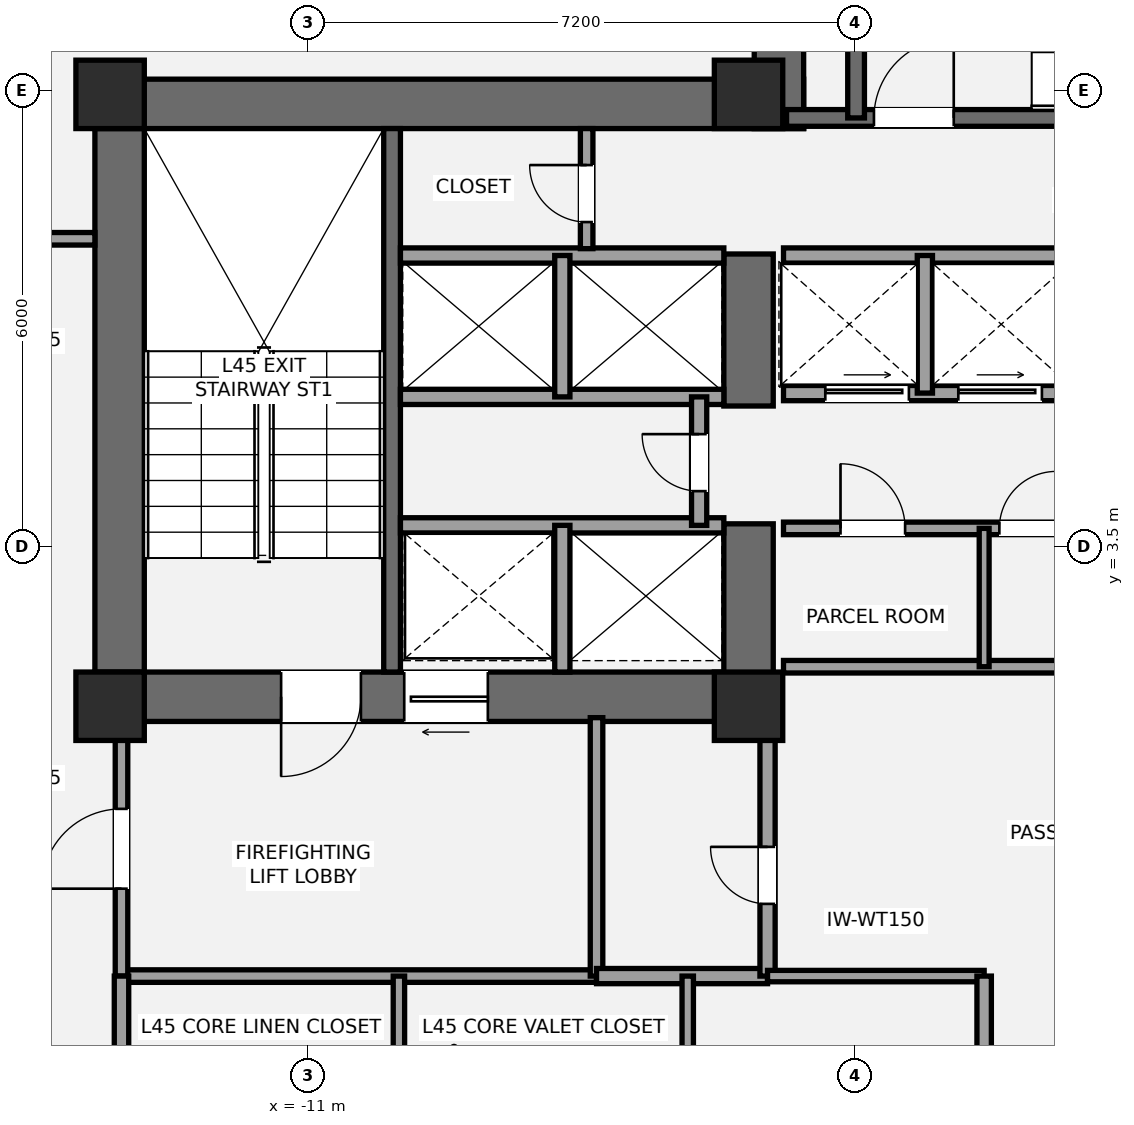
"""IFC4 building model, lengths in metres.
Left out: names, types, materials, properties, quantities, classifications, styles, units other than length and angle.
Written with IfcOpenShell. Run it as: python <this file> out.ifc"""

import sys

from ifc_helpers import new_model, si_unit, direction, frame, frame_2d, origin, origin_2d, place, context, subcontext, project, spatial, rectangle, extrude, element, fill, save


model = new_model("IFC4")
c1 = context("Model", 3, precision=1e-05, world=origin(), true_north=direction((0.0, 1.0)))
c2 = subcontext(c1, "Body", "Model", "MODEL_VIEW")
j1 = project(units=[si_unit("LENGTHUNIT", "METRE"), si_unit("PLANEANGLEUNIT", "RADIAN")], contexts=[c1])
p1 = place(None, origin())
s1 = spatial("IfcSite", under=j1, at=p1, CompositionType="ELEMENT")
p2 = place(p1, origin())
s2 = spatial("IfcBuilding", under=s1, at=p2, CompositionType="ELEMENT")
p3 = place(p2, frame((0.0, 0.0, 166.2)))
s3 = spatial("IfcBuildingStorey", under=s2, at=p3, CompositionType="ELEMENT", Elevation=166.2)
p4 = place(p3, frame((-13.475, 1.2, 0.0), z_axis=(0.0, 0.0, 1.0), x_axis=(0.0, 1.0, 0.0)))
e1 = element("IfcWall", 1, at=p4, inside=s3, PredefinedType="SHEAR", context=c2, shape_type="SweptSolid", body=[
    extrude(rectangle(XDim=8.45, YDim=0.65, at=frame_2d((4.225, 0.0))), origin(), (0.0, 0.0, 1.0), 3.2),
])
p5 = place(p3, frame((-13.8, 9.325, 0.0), z_axis=(0.0, 0.0, 1.0), x_axis=(1.0, 0.0, 0.0)))
e2 = element("IfcWall", 2, at=p5, inside=s3, PredefinedType="SHEAR", context=c2, shape_type="SweptSolid", body=[
    extrude(rectangle(XDim=9.325, YDim=0.65, at=frame_2d((4.663, 0.0))), origin(), (0.0, 0.0, 1.0), 3.2),
])
p6 = place(p3, frame((-4.875, 1.525, 0.0), z_axis=(0.0, 0.0, 1.0), x_axis=(-1.0, 0.0, 0.0)))
e3 = element("IfcWall", 3, at=p6, inside=s3, PredefinedType="SHEAR", context=c2, shape_type="SweptSolid", body=[
    extrude(rectangle(XDim=8.925, YDim=0.65, at=frame_2d((4.462, 0.0))), origin(), (0.0, 0.0, 1.0), 3.2),
])
p7 = place(p6, frame((5.425, 0.0, 0.0)))
e4 = element("IfcOpeningElement", 4, at=p7, cuts=e3, PredefinedType="OPENING", context=c2, shape_type="SweptSolid", body=[
    extrude(rectangle(XDim=1.05, YDim=2.15, at=frame_2d((0.525, 1.075))), frame((0.0, 0.335, 0.0), z_axis=(0.0, -1.0, 0.0), x_axis=(1.0, 0.0, 0.0)), (0.0, 0.0, 1.0), 0.67),
])
p8 = place(p6, frame((3.755, 0.0, 0.0)))
e5 = element("IfcOpeningElement", 5, at=p8, cuts=e3, PredefinedType="OPENING", context=c2, shape_type="SweptSolid", body=[
    extrude(rectangle(XDim=1.1, YDim=2.2, at=frame_2d((0.55, 1.1))), frame((0.0, 0.335, 0.0), z_axis=(0.0, -1.0, 0.0), x_axis=(1.0, 0.0, 0.0)), (0.0, 0.0, 1.0), 0.67),
])
p9 = place(p3, frame((-5.2, 1.2, 0.0), z_axis=(0.0, 0.0, 1.0), x_axis=(0.0, 1.0, 0.0)))
e6 = element("IfcWall", 6, at=p9, inside=s3, PredefinedType="SHEAR", context=c2, shape_type="SweptSolid", body=[
    extrude(rectangle(XDim=2.6, YDim=0.65, at=frame_2d((1.3, 0.0))), origin(), (0.0, 0.0, 1.0), 3.2),
])
p10 = place(p3, frame((-5.2, 5.35, 0.0), z_axis=(0.0, 0.0, 1.0), x_axis=(0.0, 1.0, 0.0)))
e7 = element("IfcWall", 7, at=p10, inside=s3, PredefinedType="SHEAR", context=c2, shape_type="SweptSolid", body=[
    extrude(rectangle(XDim=2.0, YDim=0.65, at=frame_2d((1.0, 0.0))), origin(), (0.0, 0.0, 1.0), 3.2),
])
p11 = place(p3, frame((-9.89, 1.85, 0.0), z_axis=(0.0, 0.0, 1.0), x_axis=(0.0, 1.0, 0.0)))
e8 = element("IfcWall", 8, at=p11, inside=s3, PredefinedType="SHEAR", context=c2, shape_type="SweptSolid", body=[
    extrude(rectangle(XDim=7.15, YDim=0.22, at=frame_2d((3.575, 0.0))), origin(), (0.0, 0.0, 1.0), 3.2),
])
p12 = place(p3, frame((-4.8, 9.0, 0.0), z_axis=(0.0, 0.0, 1.0), x_axis=(0.0, 1.0, 0.0)))
e9 = element("IfcWall", 9, at=p12, inside=s3, PredefinedType="SHEAR", context=c2, shape_type="SweptSolid", body=[
    extrude(rectangle(XDim=4.05, YDim=0.65, at=frame_2d((2.025, 0.0))), origin(), (0.0, 0.0, 1.0), 3.2),
])
p13 = place(p3, frame((-4.7, 9.14, 0.0), z_axis=(0.0, 0.0, 1.0), x_axis=(1.0, 0.0, 0.0)))
e10 = element("IfcWall", 10, at=p13, inside=s3, PredefinedType="SHEAR", context=c2, shape_type="SweptSolid", body=[
    extrude(rectangle(XDim=9.3, YDim=0.22, at=frame_2d((4.65, 0.0))), origin(), (0.0, 0.0, 1.0), 3.2),
])
p14 = place(p13, frame((1.15, 0.0, 0.0)))
e11 = element("IfcOpeningElement", 11, at=p14, cuts=e10, PredefinedType="OPENING", context=c2, shape_type="SweptSolid", body=[
    extrude(rectangle(XDim=1.05, YDim=2.15, at=frame_2d((0.525, 1.075))), frame((0.0, 0.12, 0.0), z_axis=(0.0, -1.0, 0.0), x_axis=(1.0, 0.0, 0.0)), (0.0, 0.0, 1.0), 0.24),
])
p15 = place(p3, frame((-3.785, 9.14, 0.0), z_axis=(0.0, 0.0, 1.0), x_axis=(0.0, 1.0, 0.0)))
e12 = element("IfcWall", 12, at=p15, inside=s3, PredefinedType="SHEAR", context=c2, shape_type="SweptSolid", body=[
    extrude(rectangle(XDim=3.26, YDim=0.22, at=frame_2d((1.63, 0.0))), origin(), (0.0, 0.0, 1.0), 3.2),
])
for number, where, z_axis, x_axis in (
    (13, (-13.6, 1.4, 0.0), (0.0, 0.0, 1.0), (1.0, 0.0, 0.0)),
    (14, (-13.6, 9.45, 0.0), (0.0, 0.0, 1.0), (1.0, 0.0, 0.0)),
    (15, (-5.2, 1.4, 0.0), (0.0, 0.0, 1.0), (1.0, 0.0, 0.0)),
    (16, (-5.2, 9.45, 0.0), (0.0, 0.0, 1.0), (1.0, 0.0, 0.0)),
):
    element("IfcColumn", number, at=place(p3, frame(where, z_axis=z_axis, x_axis=x_axis)), inside=s3, PredefinedType="COLUMN", context=c2, shape_type="SweptSolid", body=[
        extrude(rectangle(XDim=0.9, YDim=0.9, at=origin_2d()), origin(), (0.0, 0.0, 1.0), 3.2),
    ])
p16 = place(p3, frame((-13.45, -2.15, 0.0), z_axis=(0.0, 0.0, 1.0), x_axis=(1.0, 0.0, 0.0)))
e17 = element("IfcWall", 17, at=p16, inside=s3, PredefinedType="PARTITIONING", context=c2, shape_type="SweptSolid", body=[
    extrude(rectangle(XDim=6.25, YDim=0.165, at=frame_2d((3.125, 0.0))), origin(), (0.0, 0.0, 1.0), 3.02),
])
p17 = place(p3, frame((-13.45, -2.15, 0.0), z_axis=(0.0, 0.0, 1.0), x_axis=(0.0, 1.0, 0.0)))
e18 = element("IfcWall", 18, at=p17, inside=s3, PredefinedType="PARTITIONING", context=c2, shape_type="SweptSolid", body=[
    extrude(rectangle(XDim=3.4, YDim=0.165, at=frame_2d((1.7, 0.0))), origin(), (0.0, 0.0, 1.0), 2.473),
])
p18 = place(p17, frame((1.15, 0.0, 0.0)))
e19 = element("IfcOpeningElement", 19, at=p18, cuts=e18, PredefinedType="OPENING", context=c2, shape_type="SweptSolid", body=[
    extrude(rectangle(XDim=1.05, YDim=2.15, at=frame_2d((0.525, 1.075))), frame((0.0, 0.093, 0.0), z_axis=(0.0, -1.0, 0.0), x_axis=(1.0, 0.0, 0.0)), (0.0, 0.0, 1.0), 0.185),
])
p19 = place(p3, frame((-7.2, -2.15, 0.0), z_axis=(0.0, 0.0, 1.0), x_axis=(0.0, 1.0, 0.0)))
e20 = element("IfcWall", 20, at=p19, inside=s3, PredefinedType="PARTITIONING", context=c2, shape_type="SweptSolid", body=[
    extrude(rectangle(XDim=3.4, YDim=0.165, at=frame_2d((1.7, 0.0))), origin(), (0.0, 0.0, 1.0), 2.473),
])
p20 = place(p3, frame((-7.2, -2.15, 0.0), z_axis=(0.0, 0.0, 1.0), x_axis=(1.0, 0.0, 0.0)))
e21 = element("IfcWall", 21, at=p20, inside=s3, PredefinedType="SOLIDWALL", context=c2, shape_type="SweptSolid", body=[
    extrude(rectangle(XDim=2.25, YDim=0.2, at=frame_2d((1.125, 0.0))), origin(), (0.0, 0.0, 1.0), 3.02),
])
p21 = place(p3, frame((-4.95, -2.15, 0.0), z_axis=(0.0, 0.0, 1.0), x_axis=(0.0, 1.0, 0.0)))
e22 = element("IfcWall", 22, at=p21, inside=s3, PredefinedType="SOLIDWALL", context=c2, shape_type="SweptSolid", body=[
    extrude(rectangle(XDim=3.4, YDim=0.2, at=frame_2d((1.7, 0.0))), origin(), (0.0, 0.0, 1.0), 2.473),
])
p22 = place(p21, frame((0.95, 0.0, 0.0)))
e23 = element("IfcOpeningElement", 23, at=p22, cuts=e22, PredefinedType="OPENING", context=c2, shape_type="SweptSolid", body=[
    extrude(rectangle(XDim=0.75, YDim=2.1, at=frame_2d((0.375, 1.05))), frame((0.0, 0.11, 0.0), z_axis=(0.0, -1.0, 0.0), x_axis=(1.0, 0.0, 0.0)), (0.0, 0.0, 1.0), 0.22),
])
p23 = place(p3, frame((-9.78, 3.78, 0.0), z_axis=(0.0, 0.0, 1.0), x_axis=(1.0, 0.0, 0.0)))
e24 = element("IfcWall", 24, at=p23, inside=s3, PredefinedType="SOLIDWALL", context=c2, shape_type="SweptSolid", body=[
    extrude(rectangle(XDim=4.255, YDim=0.2, at=frame_2d((2.127, 0.0))), origin(), (0.0, 0.0, 1.0), 3.02),
])
p24 = place(p3, frame((-7.65, 1.85, 0.0), z_axis=(0.0, 0.0, 1.0), x_axis=(0.0, 1.0, 0.0)))
e25 = element("IfcWall", 25, at=p24, inside=s3, PredefinedType="SOLIDWALL", context=c2, shape_type="SweptSolid", body=[
    extrude(rectangle(XDim=1.93, YDim=0.2, at=frame_2d((0.965, 0.0))), origin(), (0.0, 0.0, 1.0), 3.02),
])
for number, where, z_axis, x_axis in (
    (26, (-9.78, 5.47, 0.0), (0.0, 0.0, 1.0), (1.0, 0.0, 0.0)),
    (27, (-9.78, 7.33, 0.0), (0.0, 0.0, 1.0), (1.0, 0.0, 0.0)),
):
    element("IfcWall", number, at=place(p3, frame(where, z_axis=z_axis, x_axis=x_axis)), inside=s3, PredefinedType="SOLIDWALL", context=c2, shape_type="SweptSolid", body=[
        extrude(rectangle(XDim=4.255, YDim=0.2, at=frame_2d((2.127, 0.0))), origin(), (0.0, 0.0, 1.0), 3.02),
    ])
p25 = place(p3, frame((-7.65, 5.47, 0.0), z_axis=(0.0, 0.0, 1.0), x_axis=(0.0, 1.0, 0.0)))
e28 = element("IfcWall", 28, at=p25, inside=s3, PredefinedType="SOLIDWALL", context=c2, shape_type="SweptSolid", body=[
    extrude(rectangle(XDim=1.86, YDim=0.2, at=frame_2d((0.93, 0.0))), origin(), (0.0, 0.0, 1.0), 3.02),
])
p26 = place(p3, frame((-5.85, 3.78, 0.0), z_axis=(0.0, 0.0, 1.0), x_axis=(0.0, 1.0, 0.0)))
e29 = element("IfcWall", 29, at=p26, inside=s3, PredefinedType="SOLIDWALL", context=c2, shape_type="SweptSolid", body=[
    extrude(rectangle(XDim=1.69, YDim=0.2, at=frame_2d((0.845, 0.0))), origin(), (0.0, 0.0, 1.0), 3.02),
])
p27 = place(p26, frame((0.45, 0.0, 0.0)))
e30 = element("IfcOpeningElement", 30, at=p27, cuts=e29, PredefinedType="OPENING", context=c2, shape_type="SweptSolid", body=[
    extrude(rectangle(XDim=0.75, YDim=2.1, at=frame_2d((0.375, 1.05))), frame((0.0, 0.11, 0.0), z_axis=(0.0, -1.0, 0.0), x_axis=(1.0, 0.0, 0.0)), (0.0, 0.0, 1.0), 0.22),
])
p28 = place(p3, frame((-4.74, 1.92, 0.0), z_axis=(0.0, 0.0, 1.0), x_axis=(1.0, 0.0, 0.0)))
e31 = element("IfcWall", 31, at=p28, inside=s3, PredefinedType="PARTITIONING", context=c2, shape_type="SweptSolid", body=[
    extrude(rectangle(XDim=3.89, YDim=0.165, at=frame_2d((1.945, 0.0))), origin(), (0.0, 0.0, 1.0), 2.16),
])
p29 = place(p3, frame((-4.74, 3.74, 0.0), z_axis=(0.0, 0.0, 1.0), x_axis=(1.0, 0.0, 0.0)))
e32 = element("IfcWall", 32, at=p29, inside=s3, PredefinedType="PARTITIONING", context=c2, shape_type="SweptSolid", body=[
    extrude(rectangle(XDim=3.89, YDim=0.165, at=frame_2d((1.945, 0.0))), origin(), (0.0, 0.0, 1.0), 3.02),
])
p30 = place(p29, frame((0.75, 0.0, 0.0)))
e33 = element("IfcOpeningElement", 33, at=p30, cuts=e32, PredefinedType="OPENING", context=c2, shape_type="SweptSolid", body=[
    extrude(rectangle(XDim=0.85, YDim=2.1, at=frame_2d((0.425, 1.05))), frame((0.0, 0.093, 0.0), z_axis=(0.0, -1.0, 0.0), x_axis=(1.0, 0.0, 0.0)), (0.0, 0.0, 1.0), 0.185),
])
p31 = place(p29, frame((2.84, 0.0, 0.0)))
e34 = element("IfcOpeningElement", 34, at=p31, cuts=e32, PredefinedType="OPENING", context=c2, shape_type="SweptSolid", body=[
    extrude(rectangle(XDim=0.75, YDim=2.1, at=frame_2d((0.375, 1.05))), frame((0.0, 0.093, 0.0), z_axis=(0.0, -1.0, 0.0), x_axis=(1.0, 0.0, 0.0)), (0.0, 0.0, 1.0), 0.185),
])
p32 = place(p3, frame((-2.1, 1.92, 0.0), z_axis=(0.0, 0.0, 1.0), x_axis=(0.0, 1.0, 0.0)))
e35 = element("IfcWall", 35, at=p32, inside=s3, PredefinedType="PARTITIONING", context=c2, shape_type="SweptSolid", body=[
    extrude(rectangle(XDim=1.82, YDim=0.13, at=frame_2d((0.91, 0.0))), origin(), (0.0, 0.0, 1.0), 3.02),
])
p33 = place(p3, frame((-4.74, 5.52, 0.0), z_axis=(0.0, 0.0, 1.0), x_axis=(1.0, 0.0, 0.0)))
e36 = element("IfcWall", 36, at=p33, inside=s3, PredefinedType="SOLIDWALL", context=c2, shape_type="SweptSolid", body=[
    extrude(rectangle(XDim=3.86, YDim=0.2, at=frame_2d((1.93, 0.0))), origin(), (0.0, 0.0, 1.0), 3.02),
])
p34 = place(p33, frame((0.55, 0.0, 0.0)))
e37 = element("IfcOpeningElement", 37, at=p34, cuts=e36, PredefinedType="OPENING", context=c2, shape_type="SweptSolid", body=[
    extrude(rectangle(XDim=1.1, YDim=2.2, at=frame_2d((0.55, 1.1))), frame((0.0, 0.11, 0.0), z_axis=(0.0, -1.0, 0.0), x_axis=(1.0, 0.0, 0.0)), (0.0, 0.0, 1.0), 0.22),
])
p35 = place(p33, frame((2.3, 0.0, 0.0)))
e38 = element("IfcOpeningElement", 38, at=p35, cuts=e36, PredefinedType="OPENING", context=c2, shape_type="SweptSolid", body=[
    extrude(rectangle(XDim=1.1, YDim=2.2, at=frame_2d((0.55, 1.1))), frame((0.0, 0.11, 0.0), z_axis=(0.0, -1.0, 0.0), x_axis=(1.0, 0.0, 0.0)), (0.0, 0.0, 1.0), 0.22),
])
p36 = place(p3, frame((-4.74, 7.33, 0.0), z_axis=(0.0, 0.0, 1.0), x_axis=(1.0, 0.0, 0.0)))
e39 = element("IfcWall", 39, at=p36, inside=s3, PredefinedType="SOLIDWALL", context=c2, shape_type="SweptSolid", body=[
    extrude(rectangle(XDim=3.86, YDim=0.2, at=frame_2d((1.93, 0.0))), origin(), (0.0, 0.0, 1.0), 3.02),
])
p37 = place(p3, frame((-2.88, 5.52, 0.0), z_axis=(0.0, 0.0, 1.0), x_axis=(0.0, 1.0, 0.0)))
e40 = element("IfcWall", 40, at=p37, inside=s3, PredefinedType="SOLIDWALL", context=c2, shape_type="SweptSolid", body=[
    extrude(rectangle(XDim=1.81, YDim=0.2, at=frame_2d((0.905, 0.0))), origin(), (0.0, 0.0, 1.0), 3.02),
])
p38 = place(p3, frame((-7.33, 7.42, 0.0), z_axis=(0.0, 0.0, 1.0), x_axis=(0.0, 1.0, 0.0)))
e41 = element("IfcWall", 41, at=p38, inside=s3, PredefinedType="PARTITIONING", context=c2, shape_type="SweptSolid", body=[
    extrude(rectangle(XDim=1.58, YDim=0.165, at=frame_2d((0.79, 0.0))), origin(), (0.0, 0.0, 1.0), 3.02),
])
p39 = place(p38, frame((0.35, 0.0, 0.0)))
e42 = element("IfcOpeningElement", 42, at=p39, cuts=e41, PredefinedType="OPENING", context=c2, shape_type="SweptSolid", body=[
    extrude(rectangle(XDim=0.75, YDim=2.1, at=frame_2d((0.375, 1.05))), frame((0.0, 0.093, 0.0), z_axis=(0.0, -1.0, 0.0), x_axis=(1.0, 0.0, 0.0)), (0.0, 0.0, 1.0), 0.185),
])
p40 = place(p3, frame((-4.95, -2.15, 0.0), z_axis=(0.0, 0.0, 1.0), x_axis=(1.0, 0.0, 0.0)))
e43 = element("IfcWall", 43, at=p40, inside=s3, PredefinedType="PLUMBINGWALL", context=c2, shape_type="SweptSolid", body=[
    extrude(rectangle(XDim=2.85, YDim=0.15, at=frame_2d((1.425, 0.0))), origin(), (0.0, 0.0, 1.0), 2.473),
])
p41 = place(p3, frame((-13.45, -4.05, 0.0), z_axis=(0.0, 0.0, 1.0), x_axis=(0.0, 1.0, 0.0)))
e44 = element("IfcWall", 44, at=p41, inside=s3, PredefinedType="PLUMBINGWALL", context=c2, shape_type="SweptSolid", body=[
    extrude(rectangle(XDim=1.9, YDim=0.19, at=frame_2d((0.95, 0.0))), origin(), (0.0, 0.0, 1.0), 3.02),
])
p42 = place(p3, frame((-2.1, -4.05, 0.0), z_axis=(0.0, 0.0, 1.0), x_axis=(0.0, 1.0, 0.0)))
e45 = element("IfcWall", 45, at=p42, inside=s3, PredefinedType="PLUMBINGWALL", context=c2, shape_type="SweptSolid", body=[
    extrude(rectangle(XDim=1.9, YDim=0.19, at=frame_2d((0.95, 0.0))), origin(), (0.0, 0.0, 1.0), 2.473),
])
p43 = place(p3, frame((-9.8, -4.05, 0.0), z_axis=(0.0, 0.0, 1.0), x_axis=(0.0, 1.0, 0.0)))
e46 = element("IfcWall", 46, at=p43, inside=s3, PredefinedType="PLUMBINGWALL", context=c2, shape_type="SweptSolid", body=[
    extrude(rectangle(XDim=1.9, YDim=0.15, at=frame_2d((0.95, 0.0))), origin(), (0.0, 0.0, 1.0), 3.02),
])
p44 = place(p3, frame((-6.0, -4.05, 0.0), z_axis=(0.0, 0.0, 1.0), x_axis=(0.0, 1.0, 0.0)))
e47 = element("IfcWall", 47, at=p44, inside=s3, PredefinedType="PLUMBINGWALL", context=c2, shape_type="SweptSolid", body=[
    extrude(rectangle(XDim=1.9, YDim=0.15, at=frame_2d((0.95, 0.0))), origin(), (0.0, 0.0, 1.0), 2.473),
])
p45 = place(p3, frame((-15.95, 7.55, 0.0), z_axis=(0.0, 0.0, 1.0), x_axis=(1.0, 0.0, 0.0)))
e48 = element("IfcWall", 48, at=p45, inside=s3, PredefinedType="PARTITIONING", context=c2, shape_type="SweptSolid", body=[
    extrude(rectangle(XDim=2.15, YDim=0.165, at=frame_2d((1.075, 0.0))), origin(), (0.0, 0.0, 1.0), 3.02),
])
p46 = place(p45, frame((0.3, 0.0, 0.0)))
e49 = element("IfcOpeningElement", 49, at=p46, cuts=e48, PredefinedType="OPENING", context=c2, shape_type="SweptSolid", body=[
    extrude(rectangle(XDim=1.0, YDim=2.15, at=frame_2d((0.5, 1.075))), frame((0.0, 0.093, 0.0), z_axis=(0.0, -1.0, 0.0), x_axis=(1.0, 0.0, 0.0)), (0.0, 0.0, 1.0), 0.185),
])
p47 = place(p7, origin())
e50 = element("IfcDoor", 50, at=p47, inside=s3, OperationType="SINGLE_SWING_RIGHT", PredefinedType="DOOR", context=c2, shape_type="SweptSolid", body=[
    extrude(rectangle(XDim=1.05, YDim=2.15, at=frame_2d((0.525, 1.075))), frame((0.0, 0.025, 0.0), z_axis=(0.0, -1.0, 0.0), x_axis=(1.0, 0.0, 0.0)), (0.0, 0.0, 1.0), 0.05),
])
fill(e4, e50)
p48 = place(p14, origin())
e51 = element("IfcDoor", 51, at=p48, inside=s3, OperationType="SINGLE_SWING_RIGHT", PredefinedType="DOOR", context=c2, shape_type="SweptSolid", body=[
    extrude(rectangle(XDim=1.05, YDim=2.15, at=frame_2d((0.525, 1.075))), frame((0.0, 0.025, 0.0), z_axis=(0.0, -1.0, 0.0), x_axis=(1.0, 0.0, 0.0)), (0.0, 0.0, 1.0), 0.05),
])
fill(e11, e51)
p49 = place(p18, origin())
e52 = element("IfcDoor", 52, at=p49, inside=s3, OperationType="SINGLE_SWING_LEFT", PredefinedType="DOOR", context=c2, shape_type="SweptSolid", body=[
    extrude(rectangle(XDim=1.05, YDim=2.15, at=frame_2d((0.525, 1.075))), frame((0.0, 0.025, 0.0), z_axis=(0.0, -1.0, 0.0), x_axis=(1.0, 0.0, 0.0)), (0.0, 0.0, 1.0), 0.05),
])
fill(e19, e52)
p50 = place(p22, origin())
e53 = element("IfcDoor", 53, at=p50, inside=s3, OperationType="SINGLE_SWING_RIGHT", PredefinedType="DOOR", context=c2, shape_type="SweptSolid", body=[
    extrude(rectangle(XDim=0.75, YDim=2.1, at=frame_2d((0.375, 1.05))), frame((0.0, 0.025, 0.0), z_axis=(0.0, -1.0, 0.0), x_axis=(1.0, 0.0, 0.0)), (0.0, 0.0, 1.0), 0.05),
])
fill(e23, e53)
p51 = place(p8, origin())
e54 = element("IfcDoor", 54, at=p51, inside=s3, OperationType="SLIDING_TO_LEFT", PredefinedType="DOOR", context=c2, shape_type="SweptSolid", body=[
    extrude(rectangle(XDim=1.1, YDim=2.2, at=frame_2d((0.55, 1.1))), frame((0.0, 0.025, 0.0), z_axis=(0.0, -1.0, 0.0), x_axis=(1.0, 0.0, 0.0)), (0.0, 0.0, 1.0), 0.05),
])
fill(e5, e54)
p52 = place(p27, origin())
e55 = element("IfcDoor", 55, at=p52, inside=s3, OperationType="SINGLE_SWING_RIGHT", PredefinedType="DOOR", context=c2, shape_type="SweptSolid", body=[
    extrude(rectangle(XDim=0.75, YDim=2.1, at=frame_2d((0.375, 1.05))), frame((0.0, 0.025, 0.0), z_axis=(0.0, -1.0, 0.0), x_axis=(1.0, 0.0, 0.0)), (0.0, 0.0, 1.0), 0.05),
])
fill(e30, e55)
p53 = place(p30, origin())
e56 = element("IfcDoor", 56, at=p53, inside=s3, OperationType="SINGLE_SWING_LEFT", PredefinedType="DOOR", context=c2, shape_type="SweptSolid", body=[
    extrude(rectangle(XDim=0.85, YDim=2.1, at=frame_2d((0.425, 1.05))), frame((0.0, 0.025, 0.0), z_axis=(0.0, -1.0, 0.0), x_axis=(1.0, 0.0, 0.0)), (0.0, 0.0, 1.0), 0.05),
])
fill(e33, e56)
p54 = place(p31, origin())
e57 = element("IfcDoor", 57, at=p54, inside=s3, OperationType="SINGLE_SWING_RIGHT", PredefinedType="DOOR", context=c2, shape_type="SweptSolid", body=[
    extrude(rectangle(XDim=0.75, YDim=2.1, at=frame_2d((0.375, 1.05))), frame((0.0, 0.025, 0.0), z_axis=(0.0, -1.0, 0.0), x_axis=(1.0, 0.0, 0.0)), (0.0, 0.0, 1.0), 0.05),
])
fill(e34, e57)
p55 = place(p34, origin())
e58 = element("IfcDoor", 58, at=p55, inside=s3, OperationType="SLIDING_TO_LEFT", PredefinedType="DOOR", context=c2, shape_type="SweptSolid", body=[
    extrude(rectangle(XDim=1.1, YDim=2.2, at=frame_2d((0.55, 1.1))), frame((0.0, 0.025, 0.0), z_axis=(0.0, -1.0, 0.0), x_axis=(1.0, 0.0, 0.0)), (0.0, 0.0, 1.0), 0.05),
])
fill(e37, e58)
p56 = place(p35, origin())
e59 = element("IfcDoor", 59, at=p56, inside=s3, OperationType="SLIDING_TO_LEFT", PredefinedType="DOOR", context=c2, shape_type="SweptSolid", body=[
    extrude(rectangle(XDim=1.1, YDim=2.2, at=frame_2d((0.55, 1.1))), frame((0.0, 0.025, 0.0), z_axis=(0.0, -1.0, 0.0), x_axis=(1.0, 0.0, 0.0)), (0.0, 0.0, 1.0), 0.05),
])
fill(e38, e59)
p57 = place(p39, origin())
e60 = element("IfcDoor", 60, at=p57, inside=s3, OperationType="SINGLE_SWING_RIGHT", PredefinedType="DOOR", context=c2, shape_type="SweptSolid", body=[
    extrude(rectangle(XDim=0.75, YDim=2.1, at=frame_2d((0.375, 1.05))), frame((0.0, 0.025, 0.0), z_axis=(0.0, -1.0, 0.0), x_axis=(1.0, 0.0, 0.0)), (0.0, 0.0, 1.0), 0.05),
])
fill(e42, e60)
save(model, sys.argv[1])
